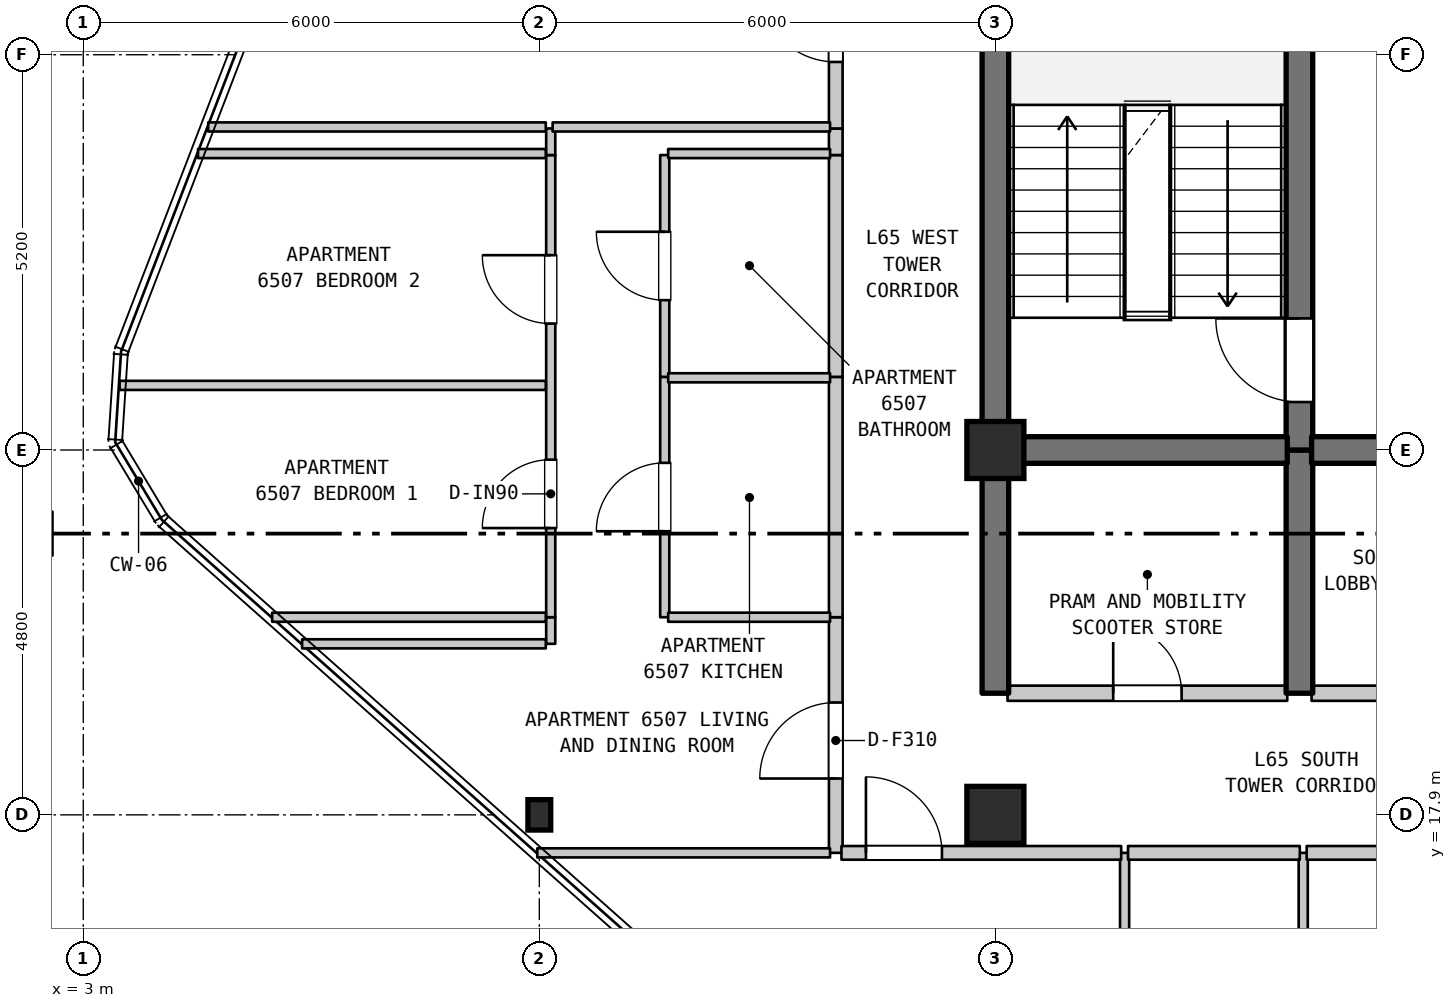
"""IFC4 building model, lengths in metres.
Left out: names, types, materials, properties, quantities, classifications, styles, units other than length and angle.
Written with IfcOpenShell. Run it as: python <this file> out.ifc"""

import sys

from ifc_helpers import new_model, si_unit, direction, frame, frame_2d, origin, origin_2d, place, context, subcontext, project, spatial, rectangle, i_section, extrude, element, fill, save


model = new_model("IFC4")
c1 = context("Model", 3, precision=1e-05, world=origin(), true_north=direction((0.0, 1.0)))
c2 = subcontext(c1, "Body", "Model", "MODEL_VIEW")
j1 = project(units=[si_unit("LENGTHUNIT", "METRE"), si_unit("PLANEANGLEUNIT", "RADIAN")], contexts=[c1])
p1 = place(None, origin())
s1 = spatial("IfcSite", under=j1, at=p1, CompositionType="ELEMENT")
p2 = place(p1, origin())
s2 = spatial("IfcBuilding", under=s1, at=p2, CompositionType="ELEMENT")
p3 = place(p2, frame((0.0, 0.0, 262.1)))
s3 = spatial("IfcBuildingStorey", under=s2, at=p3, CompositionType="ELEMENT", Elevation=262.1)
p4 = place(p3, frame((9.0, 17.9, 0.0), z_axis=(0.0, 0.0, 1.0), x_axis=(1.0, 0.0, 0.0)))
e1 = element("IfcColumn", 1, at=p4, inside=s3, PredefinedType="COLUMN", context=c2, shape_type="SweptSolid", body=[
    extrude(i_section(OverallWidth=0.3, OverallDepth=0.4, WebThickness=0.013, FlangeThickness=0.024, FilletRadius=0.027, at=origin_2d()), origin(), (0.0, 0.0, 1.0), 3.7),
])
for number, where, z_axis, x_axis in (
    (2, (15.0, 17.9, 0.0), (0.0, 0.0, 1.0), (1.0, 0.0, 0.0)),
    (3, (15.0, 22.7, 0.0), (0.0, 0.0, 1.0), (1.0, 0.0, 0.0)),
):
    element("IfcColumn", number, at=place(p3, frame(where, z_axis=z_axis, x_axis=x_axis)), inside=s3, PredefinedType="COLUMN", context=c2, shape_type="SweptSolid", body=[
        extrude(rectangle(XDim=0.75, YDim=0.75, at=origin_2d()), origin(), (0.0, 0.0, 1.0), 3.7),
    ])
p5 = place(p3, frame((9.15, 20.15, 0.0), z_axis=(0.0, 0.0, 1.0), x_axis=(0.0, 1.0, 0.0)))
e4 = element("IfcWall", 4, at=p5, inside=s3, PredefinedType="PARTITIONING", context=c2, shape_type="SweptSolid", body=[
    extrude(rectangle(XDim=0.35, YDim=0.12, at=frame_2d((0.175, 0.0))), origin(), (0.0, 0.0, 1.0), 3.39),
])
p6 = place(p3, frame((9.15, 20.5, 0.0), z_axis=(0.0, 0.0, 1.0), x_axis=(0.0, 1.0, 0.0)))
e5 = element("IfcWall", 5, at=p6, inside=s3, PredefinedType="PARTITIONING", context=c2, shape_type="SweptSolid", body=[
    extrude(rectangle(XDim=6.08, YDim=0.12, at=frame_2d((3.04, 0.0))), origin(), (0.0, 0.0, 1.0), 2.79),
])
p7 = place(p6, frame((1.173, 0.0, 0.0)))
e6 = element("IfcOpeningElement", 6, at=p7, cuts=e5, PredefinedType="OPENING", context=c2, shape_type="SweptSolid", body=[
    extrude(rectangle(XDim=0.9, YDim=2.15, at=frame_2d((0.45, 1.075))), frame((0.0, 0.07, 0.0), z_axis=(0.0, -1.0, 0.0), x_axis=(1.0, 0.0, 0.0)), (0.0, 0.0, 1.0), 0.14),
])
p8 = place(p6, frame((3.863, 0.0, 0.0)))
e7 = element("IfcOpeningElement", 7, at=p8, cuts=e5, PredefinedType="OPENING", context=c2, shape_type="SweptSolid", body=[
    extrude(rectangle(XDim=0.9, YDim=2.15, at=frame_2d((0.45, 1.075))), frame((0.0, 0.07, 0.0), z_axis=(0.0, -1.0, 0.0), x_axis=(1.0, 0.0, 0.0)), (0.0, 0.0, 1.0), 0.14),
])
p9 = place(p3, frame((9.15, 26.58, 0.0), z_axis=(0.0, 0.0, 1.0), x_axis=(0.0, 1.0, 0.0)))
e8 = element("IfcWall", 8, at=p9, inside=s3, PredefinedType="PARTITIONING", context=c2, shape_type="SweptSolid", body=[
    extrude(rectangle(XDim=0.35, YDim=0.12, at=frame_2d((0.175, 0.0))), origin(), (0.0, 0.0, 1.0), 3.39),
])
p10 = place(p3, frame((10.65, 20.5, 0.0), z_axis=(0.0, 0.0, 1.0), x_axis=(0.0, 1.0, 0.0)))
e9 = element("IfcWall", 9, at=p10, inside=s3, PredefinedType="PARTITIONING", context=c2, shape_type="SweptSolid", body=[
    extrude(rectangle(XDim=3.162, YDim=0.12, at=frame_2d((1.581, 0.0))), origin(), (0.0, 0.0, 1.0), 3.39),
])
p11 = place(p10, frame((1.131, 0.0, 0.0)))
e10 = element("IfcOpeningElement", 10, at=p11, cuts=e9, PredefinedType="OPENING", context=c2, shape_type="SweptSolid", body=[
    extrude(rectangle(XDim=0.9, YDim=2.15, at=frame_2d((0.45, 1.075))), frame((0.0, 0.07, 0.0), z_axis=(0.0, -1.0, 0.0), x_axis=(1.0, 0.0, 0.0)), (0.0, 0.0, 1.0), 0.14),
])
p12 = place(p3, frame((10.65, 23.662, 0.0), z_axis=(0.0, 0.0, 1.0), x_axis=(0.0, 1.0, 0.0)))
e11 = element("IfcWall", 11, at=p12, inside=s3, PredefinedType="PARTITIONING", context=c2, shape_type="SweptSolid", body=[
    extrude(rectangle(XDim=2.918, YDim=0.12, at=frame_2d((1.459, 0.0))), origin(), (0.0, 0.0, 1.0), 3.39),
])
p13 = place(p12, frame((1.009, 0.0, 0.0)))
e12 = element("IfcOpeningElement", 12, at=p13, cuts=e11, PredefinedType="OPENING", context=c2, shape_type="SweptSolid", body=[
    extrude(rectangle(XDim=0.9, YDim=2.1, at=frame_2d((0.45, 1.05))), frame((0.0, 0.07, 0.0), z_axis=(0.0, -1.0, 0.0), x_axis=(1.0, 0.0, 0.0)), (0.0, 0.0, 1.0), 0.14),
])
p14 = place(p3, frame((12.9, 17.4, 0.0), z_axis=(0.0, 0.0, 1.0), x_axis=(0.0, 1.0, 0.0)))
e13 = element("IfcWall", 13, at=p14, inside=s3, PredefinedType="STANDARD", context=c2, shape_type="SweptSolid", body=[
    extrude(rectangle(XDim=3.1, YDim=0.18, at=frame_2d((1.55, 0.0))), origin(), (0.0, 0.0, 1.0), 3.39),
])
p15 = place(p14, frame((0.978, 0.0, 0.0)))
e14 = element("IfcOpeningElement", 14, at=p15, cuts=e13, PredefinedType="OPENING", context=c2, shape_type="SweptSolid", body=[
    extrude(rectangle(XDim=1.0, YDim=2.15, at=frame_2d((0.5, 1.075))), frame((0.0, 0.1, 0.0), z_axis=(0.0, -1.0, 0.0), x_axis=(1.0, 0.0, 0.0)), (0.0, 0.0, 1.0), 0.2),
])
p16 = place(p3, frame((12.9, 20.5, 0.0), z_axis=(0.0, 0.0, 1.0), x_axis=(0.0, 1.0, 0.0)))
e15 = element("IfcWall", 15, at=p16, inside=s3, PredefinedType="STANDARD", context=c2, shape_type="SweptSolid", body=[
    extrude(rectangle(XDim=3.162, YDim=0.18, at=frame_2d((1.581, 0.0))), origin(), (0.0, 0.0, 1.0), 3.39),
])
p17 = place(p3, frame((12.9, 23.662, 0.0), z_axis=(0.0, 0.0, 1.0), x_axis=(0.0, 1.0, 0.0)))
e16 = element("IfcWall", 16, at=p17, inside=s3, PredefinedType="STANDARD", context=c2, shape_type="SweptSolid", body=[
    extrude(rectangle(XDim=2.918, YDim=0.18, at=frame_2d((1.459, 0.0))), origin(), (0.0, 0.0, 1.0), 3.39),
])
p18 = place(p3, frame((12.9, 26.58, 0.0), z_axis=(0.0, 0.0, 1.0), x_axis=(0.0, 1.0, 0.0)))
e17 = element("IfcWall", 17, at=p18, inside=s3, PredefinedType="STANDARD", context=c2, shape_type="SweptSolid", body=[
    extrude(rectangle(XDim=0.35, YDim=0.18, at=frame_2d((0.175, 0.0))), origin(), (0.0, 0.0, 1.0), 3.39),
])
p19 = place(p3, frame((12.9, 26.93, 0.0), z_axis=(0.0, 0.0, 1.0), x_axis=(0.0, 1.0, 0.0)))
e18 = element("IfcWall", 18, at=p19, inside=s3, PredefinedType="STANDARD", context=c2, shape_type="SweptSolid", body=[
    extrude(rectangle(XDim=2.75, YDim=0.18, at=frame_2d((1.375, 0.0))), origin(), (0.0, 0.0, 1.0), 3.39),
])
p20 = place(p19, frame((0.875, 0.0, 0.0)))
e19 = element("IfcOpeningElement", 19, at=p20, cuts=e18, PredefinedType="OPENING", context=c2, shape_type="SweptSolid", body=[
    extrude(rectangle(XDim=1.0, YDim=2.15, at=frame_2d((0.5, 1.075))), frame((0.0, 0.1, 0.0), z_axis=(0.0, -1.0, 0.0), x_axis=(1.0, 0.0, 0.0)), (0.0, 0.0, 1.0), 0.2),
])
p21 = place(p3, frame((15.0, 19.5, 0.0), z_axis=(0.0, 0.0, 1.0), x_axis=(0.0, 1.0, 0.0)))
e20 = element("IfcWall", 20, at=p21, inside=s3, PredefinedType="SHEAR", context=c2, shape_type="SweptSolid", body=[
    extrude(rectangle(XDim=3.2, YDim=0.35, at=frame_2d((1.6, 0.0))), origin(), (0.0, 0.0, 1.0), 3.39),
])
p22 = place(p3, frame((15.0, 22.7, 0.0), z_axis=(0.0, 0.0, 1.0), x_axis=(0.0, 1.0, 0.0)))
e21 = element("IfcWall", 21, at=p22, inside=s3, PredefinedType="SHEAR", context=c2, shape_type="SweptSolid", body=[
    extrude(rectangle(XDim=6.8, YDim=0.35, at=frame_2d((3.4, 0.0))), origin(), (0.0, 0.0, 1.0), 3.39),
])
p23 = place(p3, frame((16.7, 14.2, 0.0), z_axis=(0.0, 0.0, 1.0), x_axis=(0.0, 1.0, 0.0)))
e22 = element("IfcWall", 22, at=p23, inside=s3, PredefinedType="PARTITIONING", context=c2, shape_type="SweptSolid", body=[
    extrude(rectangle(XDim=3.2, YDim=0.12, at=frame_2d((1.6, 0.0))), origin(), (0.0, 0.0, 1.0), 3.39),
])
p24 = place(p23, frame((1.15, 0.0, 0.0)))
e23 = element("IfcOpeningElement", 23, at=p24, cuts=e22, PredefinedType="OPENING", context=c2, shape_type="SweptSolid", body=[
    extrude(rectangle(XDim=0.9, YDim=2.15, at=frame_2d((0.45, 1.075))), frame((0.0, 0.07, 0.0), z_axis=(0.0, -1.0, 0.0), x_axis=(1.0, 0.0, 0.0)), (0.0, 0.0, 1.0), 0.14),
])
p25 = place(p3, frame((19.0, 19.5, 0.0), z_axis=(0.0, 0.0, 1.0), x_axis=(0.0, 1.0, 0.0)))
e24 = element("IfcWall", 24, at=p25, inside=s3, PredefinedType="SHEAR", context=c2, shape_type="SweptSolid", body=[
    extrude(rectangle(XDim=3.2, YDim=0.35, at=frame_2d((1.6, 0.0))), origin(), (0.0, 0.0, 1.0), 3.39),
])
p26 = place(p3, frame((19.0, 22.7, 0.0), z_axis=(0.0, 0.0, 1.0), x_axis=(0.0, 1.0, 0.0)))
e25 = element("IfcWall", 25, at=p26, inside=s3, PredefinedType="SHEAR", context=c2, shape_type="SweptSolid", body=[
    extrude(rectangle(XDim=5.5, YDim=0.35, at=frame_2d((2.75, 0.0))), origin(), (0.0, 0.0, 1.0), 3.39),
])
p27 = place(p26, frame((0.631, 0.0, 0.0)))
e26 = element("IfcOpeningElement", 26, at=p27, cuts=e25, PredefinedType="OPENING", context=c2, shape_type="SweptSolid", body=[
    extrude(rectangle(XDim=1.1, YDim=2.15, at=frame_2d((0.55, 1.075))), frame((0.0, 0.185, 0.0), z_axis=(0.0, -1.0, 0.0), x_axis=(1.0, 0.0, 0.0)), (0.0, 0.0, 1.0), 0.37),
])
p28 = place(p3, frame((19.05, 14.2, 0.0), z_axis=(0.0, 0.0, 1.0), x_axis=(0.0, 1.0, 0.0)))
e27 = element("IfcWall", 27, at=p28, inside=s3, PredefinedType="PARTITIONING", context=c2, shape_type="SweptSolid", body=[
    extrude(rectangle(XDim=3.2, YDim=0.12, at=frame_2d((1.6, 0.0))), origin(), (0.0, 0.0, 1.0), 3.39),
])
p29 = place(p3, frame((8.973, 17.4, 0.0), z_axis=(0.0, 0.0, 1.0), x_axis=(1.0, 0.0, 0.0)))
e28 = element("IfcWall", 28, at=p29, inside=s3, PredefinedType="PARTITIONING", context=c2, shape_type="SweptSolid", body=[
    extrude(rectangle(XDim=3.852, YDim=0.12, at=frame_2d((1.926, 0.0))), origin(), (0.0, 0.0, 1.0), 3.39),
])
p30 = place(p3, frame((12.975, 17.4, 0.0), z_axis=(0.0, 0.0, 1.0), x_axis=(1.0, 0.0, 0.0)))
e29 = element("IfcWall", 29, at=p30, inside=s3, PredefinedType="STANDARD", context=c2, shape_type="SweptSolid", body=[
    extrude(rectangle(XDim=3.68, YDim=0.18, at=frame_2d((1.84, 0.0))), origin(), (0.0, 0.0, 1.0), 3.39),
])
p31 = place(p30, frame((0.322, 0.0, 0.0)))
e30 = element("IfcOpeningElement", 30, at=p31, cuts=e29, PredefinedType="OPENING", context=c2, shape_type="SweptSolid", body=[
    extrude(rectangle(XDim=1.0, YDim=2.15, at=frame_2d((0.5, 1.075))), frame((0.0, 0.1, 0.0), z_axis=(0.0, -1.0, 0.0), x_axis=(1.0, 0.0, 0.0)), (0.0, 0.0, 1.0), 0.2),
])
p32 = place(p3, frame((16.745, 17.4, 0.0), z_axis=(0.0, 0.0, 1.0), x_axis=(1.0, 0.0, 0.0)))
e31 = element("IfcWall", 31, at=p32, inside=s3, PredefinedType="STANDARD", context=c2, shape_type="SweptSolid", body=[
    extrude(rectangle(XDim=2.26, YDim=0.18, at=frame_2d((1.13, 0.0))), origin(), (0.0, 0.0, 1.0), 3.39),
])
p33 = place(p3, frame((19.095, 17.4, 0.0), z_axis=(0.0, 0.0, 1.0), x_axis=(1.0, 0.0, 0.0)))
e32 = element("IfcWall", 32, at=p33, inside=s3, PredefinedType="STANDARD", context=c2, shape_type="SweptSolid", body=[
    extrude(rectangle(XDim=2.06, YDim=0.18, at=frame_2d((1.03, 0.0))), origin(), (0.0, 0.0, 1.0), 3.39),
])
p34 = place(p3, frame((15.16, 19.5, 0.0), z_axis=(0.0, 0.0, 1.0), x_axis=(1.0, 0.0, 0.0)))
e33 = element("IfcWall", 33, at=p34, inside=s3, PredefinedType="STANDARD", context=c2, shape_type="SweptSolid", body=[
    extrude(rectangle(XDim=3.68, YDim=0.2, at=frame_2d((1.84, 0.0))), origin(), (0.0, 0.0, 1.0), 3.39),
])
p35 = place(p34, frame((1.39, 0.0, 0.0)))
e34 = element("IfcOpeningElement", 34, at=p35, cuts=e33, PredefinedType="OPENING", context=c2, shape_type="SweptSolid", body=[
    extrude(rectangle(XDim=0.9, YDim=2.15, at=frame_2d((0.45, 1.075))), frame((0.0, 0.11, 0.0), z_axis=(0.0, -1.0, 0.0), x_axis=(1.0, 0.0, 0.0)), (0.0, 0.0, 1.0), 0.22),
])
p36 = place(p3, frame((19.16, 19.5, 0.0), z_axis=(0.0, 0.0, 1.0), x_axis=(1.0, 0.0, 0.0)))
e35 = element("IfcWall", 35, at=p36, inside=s3, PredefinedType="STANDARD", context=c2, shape_type="SweptSolid", body=[
    extrude(rectangle(XDim=4.48, YDim=0.2, at=frame_2d((2.24, 0.0))), origin(), (0.0, 0.0, 1.0), 3.39),
])
p37 = place(p36, frame((1.64, 0.0, 0.0)))
e36 = element("IfcOpeningElement", 36, at=p37, cuts=e35, PredefinedType="OPENING", context=c2, shape_type="SweptSolid", body=[
    extrude(rectangle(XDim=1.2, YDim=2.2, at=frame_2d((0.6, 1.1))), frame((0.0, 0.11, 0.0), z_axis=(0.0, -1.0, 0.0), x_axis=(1.0, 0.0, 0.0)), (0.0, 0.0, 1.0), 0.22),
])
p38 = place(p3, frame((5.879, 20.15, 0.0), z_axis=(0.0, 0.0, 1.0), x_axis=(1.0, 0.0, 0.0)))
e37 = element("IfcWall", 37, at=p38, inside=s3, PredefinedType="PARTITIONING", context=c2, shape_type="SweptSolid", body=[
    extrude(rectangle(XDim=3.206, YDim=0.12, at=frame_2d((1.603, 0.0))), origin(), (0.0, 0.0, 1.0), 3.39),
])
p39 = place(p3, frame((5.485, 20.5, 0.0), z_axis=(0.0, 0.0, 1.0), x_axis=(1.0, 0.0, 0.0)))
e38 = element("IfcWall", 38, at=p39, inside=s3, PredefinedType="PARTITIONING", context=c2, shape_type="SweptSolid", body=[
    extrude(rectangle(XDim=3.6, YDim=0.12, at=frame_2d((1.8, 0.0))), origin(), (0.0, 0.0, 1.0), 3.39),
])
p40 = place(p3, frame((10.695, 20.5, 0.0), z_axis=(0.0, 0.0, 1.0), x_axis=(1.0, 0.0, 0.0)))
e39 = element("IfcWall", 39, at=p40, inside=s3, PredefinedType="PARTITIONING", context=c2, shape_type="SweptSolid", body=[
    extrude(rectangle(XDim=2.13, YDim=0.12, at=frame_2d((1.065, 0.0))), origin(), (0.0, 0.0, 1.0), 3.39),
])
p41 = place(p3, frame((15.16, 22.7, 0.0), z_axis=(0.0, 0.0, 1.0), x_axis=(1.0, 0.0, 0.0)))
e40 = element("IfcWall", 40, at=p41, inside=s3, PredefinedType="SHEAR", context=c2, shape_type="SweptSolid", body=[
    extrude(rectangle(XDim=3.68, YDim=0.35, at=frame_2d((1.84, 0.0))), origin(), (0.0, 0.0, 1.0), 3.39),
])
p42 = place(p3, frame((19.16, 22.7, 0.0), z_axis=(0.0, 0.0, 1.0), x_axis=(1.0, 0.0, 0.0)))
e41 = element("IfcWall", 41, at=p42, inside=s3, PredefinedType="SHEAR", context=c2, shape_type="SweptSolid", body=[
    extrude(rectangle(XDim=4.48, YDim=0.35, at=frame_2d((2.24, 0.0))), origin(), (0.0, 0.0, 1.0), 3.39),
])
p43 = place(p42, frame((1.64, 0.0, 0.0)))
e42 = element("IfcOpeningElement", 42, at=p43, cuts=e41, PredefinedType="OPENING", context=c2, shape_type="SweptSolid", body=[
    extrude(rectangle(XDim=1.2, YDim=2.2, at=frame_2d((0.6, 1.1))), frame((0.0, 0.185, 0.0), z_axis=(0.0, -1.0, 0.0), x_axis=(1.0, 0.0, 0.0)), (0.0, 0.0, 1.0), 0.37),
])
p44 = place(p3, frame((3.478, 23.55, 0.0), z_axis=(0.0, 0.0, 1.0), x_axis=(1.0, 0.0, 0.0)))
e43 = element("IfcWall", 43, at=p44, inside=s3, PredefinedType="PARTITIONING", context=c2, shape_type="SweptSolid", body=[
    extrude(rectangle(XDim=5.607, YDim=0.12, at=frame_2d((2.803, 0.0))), origin(), (0.0, 0.0, 1.0), 3.39),
])
p45 = place(p3, frame((10.695, 23.65, 0.0), z_axis=(0.0, 0.0, 1.0), x_axis=(1.0, 0.0, 0.0)))
e44 = element("IfcWall", 44, at=p45, inside=s3, PredefinedType="PARTITIONING", context=c2, shape_type="SweptSolid", body=[
    extrude(rectangle(XDim=2.13, YDim=0.12, at=frame_2d((1.065, 0.0))), origin(), (0.0, 0.0, 1.0), 3.39),
])
p46 = place(p3, frame((4.51, 26.6, 0.0), z_axis=(0.0, 0.0, 1.0), x_axis=(1.0, 0.0, 0.0)))
e45 = element("IfcWall", 45, at=p46, inside=s3, PredefinedType="PARTITIONING", context=c2, shape_type="SweptSolid", body=[
    extrude(rectangle(XDim=4.575, YDim=0.12, at=frame_2d((2.288, 0.0))), origin(), (0.0, 0.0, 1.0), 3.39),
])
p47 = place(p3, frame((10.695, 26.6, 0.0), z_axis=(0.0, 0.0, 1.0), x_axis=(1.0, 0.0, 0.0)))
e46 = element("IfcWall", 46, at=p47, inside=s3, PredefinedType="PARTITIONING", context=c2, shape_type="SweptSolid", body=[
    extrude(rectangle(XDim=2.13, YDim=0.12, at=frame_2d((1.065, 0.0))), origin(), (0.0, 0.0, 1.0), 3.39),
])
p48 = place(p3, frame((4.644, 26.95, 0.0), z_axis=(0.0, 0.0, 1.0), x_axis=(1.0, 0.0, 0.0)))
e47 = element("IfcWall", 47, at=p48, inside=s3, PredefinedType="PARTITIONING", context=c2, shape_type="SweptSolid", body=[
    extrude(rectangle(XDim=4.441, YDim=0.12, at=frame_2d((2.22, 0.0))), origin(), (0.0, 0.0, 1.0), 3.39),
])
p49 = place(p3, frame((9.175, 26.95, 0.0), z_axis=(0.0, 0.0, 1.0), x_axis=(1.0, 0.0, 0.0)))
e48 = element("IfcWall", 48, at=p49, inside=s3, PredefinedType="PARTITIONING", context=c2, shape_type="SweptSolid", body=[
    extrude(rectangle(XDim=3.65, YDim=0.12, at=frame_2d((1.825, 0.0))), origin(), (0.0, 0.0, 1.0), 3.39),
])
p50 = place(p7, origin())
e49 = element("IfcDoor", 49, at=p50, inside=s3, OperationType="SINGLE_SWING_LEFT", PredefinedType="DOOR", context=c2, shape_type="SweptSolid", body=[
    extrude(rectangle(XDim=0.9, YDim=2.15, at=frame_2d((0.45, 1.075))), frame((0.0, 0.025, 0.0), z_axis=(0.0, -1.0, 0.0), x_axis=(1.0, 0.0, 0.0)), (0.0, 0.0, 1.0), 0.05),
])
fill(e6, e49)
p51 = place(p8, origin())
e50 = element("IfcDoor", 50, at=p51, inside=s3, OperationType="SINGLE_SWING_RIGHT", PredefinedType="DOOR", context=c2, shape_type="SweptSolid", body=[
    extrude(rectangle(XDim=0.9, YDim=2.15, at=frame_2d((0.45, 1.075))), frame((0.0, 0.025, 0.0), z_axis=(0.0, -1.0, 0.0), x_axis=(1.0, 0.0, 0.0)), (0.0, 0.0, 1.0), 0.05),
])
fill(e7, e50)
p52 = place(p11, origin())
e51 = element("IfcDoor", 51, at=p52, inside=s3, OperationType="SINGLE_SWING_LEFT", PredefinedType="DOOR", context=c2, shape_type="SweptSolid", body=[
    extrude(rectangle(XDim=0.9, YDim=2.15, at=frame_2d((0.45, 1.075))), frame((0.0, 0.025, 0.0), z_axis=(0.0, -1.0, 0.0), x_axis=(1.0, 0.0, 0.0)), (0.0, 0.0, 1.0), 0.05),
])
fill(e10, e51)
p53 = place(p13, origin())
e52 = element("IfcDoor", 52, at=p53, inside=s3, OperationType="SINGLE_SWING_RIGHT", PredefinedType="DOOR", context=c2, shape_type="SweptSolid", body=[
    extrude(rectangle(XDim=0.9, YDim=2.1, at=frame_2d((0.45, 1.05))), frame((0.0, 0.025, 0.0), z_axis=(0.0, -1.0, 0.0), x_axis=(1.0, 0.0, 0.0)), (0.0, 0.0, 1.0), 0.05),
])
fill(e12, e52)
p54 = place(p15, origin())
e53 = element("IfcDoor", 53, at=p54, inside=s3, OperationType="SINGLE_SWING_LEFT", PredefinedType="DOOR", context=c2, shape_type="SweptSolid", body=[
    extrude(rectangle(XDim=1.0, YDim=2.15, at=frame_2d((0.5, 1.075))), frame((0.0, 0.025, 0.0), z_axis=(0.0, -1.0, 0.0), x_axis=(1.0, 0.0, 0.0)), (0.0, 0.0, 1.0), 0.05),
])
fill(e14, e53)
p55 = place(p20, origin())
e54 = element("IfcDoor", 54, at=p55, inside=s3, OperationType="SINGLE_SWING_RIGHT", PredefinedType="DOOR", context=c2, shape_type="SweptSolid", body=[
    extrude(rectangle(XDim=1.0, YDim=2.15, at=frame_2d((0.5, 1.075))), frame((0.0, 0.025, 0.0), z_axis=(0.0, -1.0, 0.0), x_axis=(1.0, 0.0, 0.0)), (0.0, 0.0, 1.0), 0.05),
])
fill(e19, e54)
p56 = place(p27, origin())
e55 = element("IfcDoor", 55, at=p56, inside=s3, OperationType="SINGLE_SWING_RIGHT", PredefinedType="DOOR", context=c2, shape_type="SweptSolid", body=[
    extrude(rectangle(XDim=1.1, YDim=2.15, at=frame_2d((0.55, 1.075))), frame((0.0, 0.025, 0.0), z_axis=(0.0, -1.0, 0.0), x_axis=(1.0, 0.0, 0.0)), (0.0, 0.0, 1.0), 0.05),
])
fill(e26, e55)
p57 = place(p31, origin())
e56 = element("IfcDoor", 56, at=p57, inside=s3, OperationType="SINGLE_SWING_LEFT", PredefinedType="DOOR", context=c2, shape_type="SweptSolid", body=[
    extrude(rectangle(XDim=1.0, YDim=2.15, at=frame_2d((0.5, 1.075))), frame((0.0, 0.025, 0.0), z_axis=(0.0, -1.0, 0.0), x_axis=(1.0, 0.0, 0.0)), (0.0, 0.0, 1.0), 0.05),
])
fill(e30, e56)
p58 = place(p35, origin())
e57 = element("IfcDoor", 57, at=p58, inside=s3, OperationType="SINGLE_SWING_LEFT", PredefinedType="DOOR", context=c2, shape_type="SweptSolid", body=[
    extrude(rectangle(XDim=0.9, YDim=2.15, at=frame_2d((0.45, 1.075))), frame((0.0, 0.025, 0.0), z_axis=(0.0, -1.0, 0.0), x_axis=(1.0, 0.0, 0.0)), (0.0, 0.0, 1.0), 0.05),
])
fill(e34, e57)
save(model, sys.argv[1])
